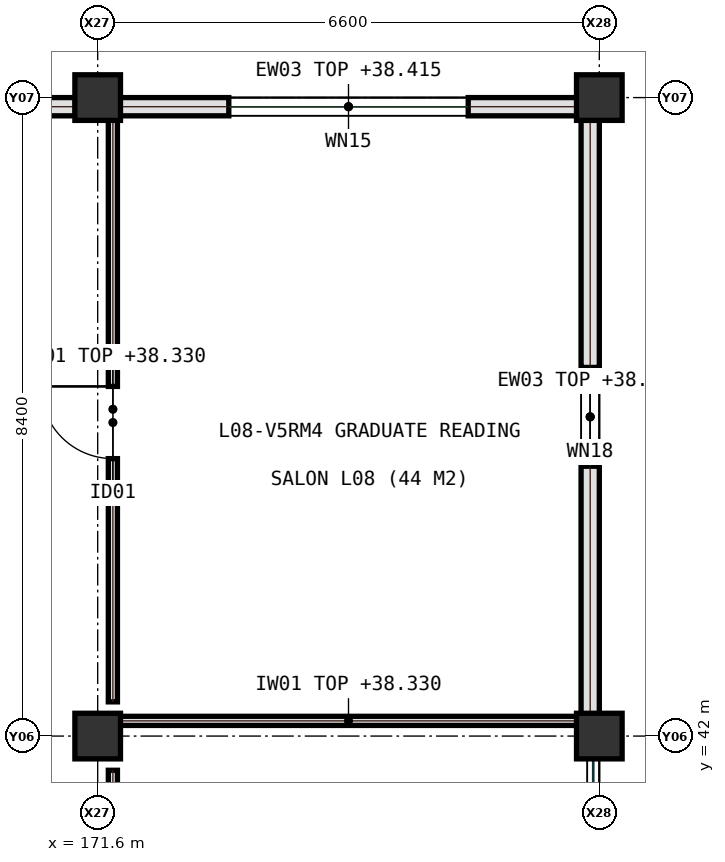
"""IFC4 building model, lengths in metres.
Left out: names, types, materials, properties, quantities, classifications, styles, units other than length and angle.
Written with IfcOpenShell. Run it as: python <this file> out.ifc"""

import sys

from ifc_helpers import new_model, si_unit, direction, frame, frame_2d, origin, origin_2d, place, context, subcontext, project, spatial, rectangle, extrude, element, fill, save


model = new_model("IFC4")
c1 = context("Model", 3, precision=1e-05, world=origin(), true_north=direction((0.0, 1.0)))
c2 = subcontext(c1, "Body", "Model", "MODEL_VIEW")
j1 = project(units=[si_unit("LENGTHUNIT", "METRE"), si_unit("PLANEANGLEUNIT", "RADIAN")], contexts=[c1])
p1 = place(None, origin())
s1 = spatial("IfcSite", under=j1, at=p1, CompositionType="ELEMENT")
p2 = place(p1, origin())
s2 = spatial("IfcBuilding", under=s1, at=p2, CompositionType="ELEMENT")
p3 = place(p2, frame((0.0, 0.0, 35.4)))
s3 = spatial("IfcBuildingStorey", under=s2, at=p3, CompositionType="ELEMENT", Elevation=35.4)
for number, where, z_axis, x_axis in (
    (1, (171.6, 42.0, 0.0), (0.0, 0.0, 1.0), (1.0, 0.0, 0.0)),
    (2, (171.6, 50.4, 0.0), (0.0, 0.0, 1.0), (1.0, 0.0, 0.0)),
    (3, (178.2, 42.0, 0.0), (0.0, 0.0, 1.0), (1.0, 0.0, 0.0)),
    (4, (178.2, 50.4, 0.0), (0.0, 0.0, 1.0), (1.0, 0.0, 0.0)),
):
    element("IfcColumn", number, at=place(p3, frame(where, z_axis=z_axis, x_axis=x_axis)), inside=s3, PredefinedType="COLUMN", context=c2, shape_type="SweptSolid", body=[
        extrude(rectangle(XDim=0.6, YDim=0.6, at=origin_2d()), origin(), (0.0, 0.0, 1.0), 3.9),
    ])
p4 = place(p3, frame((171.8, 33.65, 0.0), z_axis=(0.0, 0.0, 1.0), x_axis=(0.0, 1.0, 0.0)))
e5 = element("IfcWall", 5, at=p4, inside=s3, PredefinedType="PARTITIONING", context=c2, shape_type="SweptSolid", body=[
    extrude(rectangle(XDim=7.9, YDim=0.12, at=frame_2d((3.95, 0.0))), origin(), (0.0, 0.0, 1.0), 2.93),
])
p5 = place(p4, frame((1.4, 0.0, 0.0)))
e6 = element("IfcOpeningElement", 6, at=p5, cuts=e5, PredefinedType="OPENING", context=c2, shape_type="SweptSolid", body=[
    extrude(rectangle(XDim=0.95, YDim=2.15, at=frame_2d((0.475, 1.075))), frame((0.0, 0.07, 0.0), z_axis=(0.0, -1.0, 0.0), x_axis=(1.0, 0.0, 0.0)), (0.0, 0.0, 1.0), 0.14),
])
p6 = place(p3, frame((171.8, 42.45, 0.0), z_axis=(0.0, 0.0, 1.0), x_axis=(0.0, 1.0, 0.0)))
e7 = element("IfcWall", 7, at=p6, inside=s3, PredefinedType="PARTITIONING", context=c2, shape_type="SweptSolid", body=[
    extrude(rectangle(XDim=7.7, YDim=0.12, at=frame_2d((3.85, 0.0))), origin(), (0.0, 0.0, 1.0), 2.93),
])
p7 = place(p6, frame((3.2, 0.0, 0.0)))
e8 = element("IfcOpeningElement", 8, at=p7, cuts=e7, PredefinedType="OPENING", context=c2, shape_type="SweptSolid", body=[
    extrude(rectangle(XDim=0.95, YDim=2.15, at=frame_2d((0.475, 1.075))), frame((0.0, 0.07, 0.0), z_axis=(0.0, -1.0, 0.0), x_axis=(1.0, 0.0, 0.0)), (0.0, 0.0, 1.0), 0.14),
])
p8 = place(p3, frame((171.8, 42.2, 0.0), z_axis=(0.0, 0.0, 1.0), x_axis=(1.0, 0.0, 0.0)))
e9 = element("IfcWall", 9, at=p8, inside=s3, PredefinedType="PARTITIONING", context=c2, shape_type="SweptSolid", body=[
    extrude(rectangle(XDim=6.2, YDim=0.12, at=frame_2d((3.1, 0.0))), origin(), (0.0, 0.0, 1.0), 2.93),
])
p9 = place(p3, frame((171.305, 50.28, 0.0), z_axis=(0.0, 0.0, 1.0), x_axis=(-1.0, 0.0, 0.0)))
e10 = element("IfcWall", 10, at=p9, inside=s3, PredefinedType="SOLIDWALL", context=c2, shape_type="SweptSolid", body=[
    extrude(rectangle(XDim=6.01, YDim=0.24, at=frame_2d((3.005, 0.0))), origin(), (0.0, 0.0, 1.0), 3.015),
])
p10 = place(p9, frame((1.58, 0.0, 0.95)))
e11 = element("IfcOpeningElement", 11, at=p10, cuts=e10, PredefinedType="OPENING", context=c2, shape_type="SweptSolid", body=[
    extrude(rectangle(XDim=2.85, YDim=1.65, at=frame_2d((1.425, 0.825))), frame((0.0, 0.13, 0.0), z_axis=(0.0, -1.0, 0.0), x_axis=(1.0, 0.0, 0.0)), (0.0, 0.0, 1.0), 0.26),
])
p11 = place(p3, frame((178.08, 42.295, 0.0), z_axis=(0.0, 0.0, 1.0), x_axis=(0.0, 1.0, 0.0)))
e12 = element("IfcWall", 12, at=p11, inside=s3, PredefinedType="SOLIDWALL", context=c2, shape_type="SweptSolid", body=[
    extrude(rectangle(XDim=7.81, YDim=0.24, at=frame_2d((3.905, 0.0))), origin(), (0.0, 0.0, 1.0), 3.065),
])
p12 = place(p11, frame((3.255, 0.0, 0.95)))
e13 = element("IfcOpeningElement", 13, at=p12, cuts=e12, PredefinedType="OPENING", context=c2, shape_type="SweptSolid", body=[
    extrude(rectangle(XDim=1.3, YDim=1.75, at=frame_2d((0.65, 0.875))), frame((0.0, 0.13, 0.0), z_axis=(0.0, -1.0, 0.0), x_axis=(1.0, 0.0, 0.0)), (0.0, 0.0, 1.0), 0.26),
])
p13 = place(p3, frame((177.905, 50.28, 0.0), z_axis=(0.0, 0.0, 1.0), x_axis=(-1.0, 0.0, 0.0)))
e14 = element("IfcWall", 14, at=p13, inside=s3, PredefinedType="SOLIDWALL", context=c2, shape_type="SweptSolid", body=[
    extrude(rectangle(XDim=6.01, YDim=0.24, at=frame_2d((3.005, 0.0))), origin(), (0.0, 0.0, 1.0), 3.015),
])
p14 = place(p13, frame((1.43, 0.0, 0.95)))
e15 = element("IfcOpeningElement", 15, at=p14, cuts=e14, PredefinedType="OPENING", context=c2, shape_type="SweptSolid", body=[
    extrude(rectangle(XDim=3.15, YDim=1.7, at=frame_2d((1.575, 0.85))), frame((0.0, 0.13, 0.0), z_axis=(0.0, -1.0, 0.0), x_axis=(1.0, 0.0, 0.0)), (0.0, 0.0, 1.0), 0.26),
])
p15 = place(p7, origin())
e16 = element("IfcDoor", 16, at=p15, inside=s3, OperationType="SINGLE_SWING_RIGHT", PredefinedType="DOOR", context=c2, shape_type="SweptSolid", body=[
    extrude(rectangle(XDim=0.95, YDim=2.15, at=frame_2d((0.475, 1.075))), frame((0.0, 0.025, 0.0), z_axis=(0.0, -1.0, 0.0), x_axis=(1.0, 0.0, 0.0)), (0.0, 0.0, 1.0), 0.05),
])
fill(e8, e16)
p16 = place(p12, origin())
e17 = element("IfcWindow", 17, at=p16, inside=s3, PartitioningType="SINGLE_PANEL", PredefinedType="WINDOW", context=c2, shape_type="SweptSolid", body=[
    extrude(rectangle(XDim=1.3, YDim=1.75, at=frame_2d((0.65, 0.875))), frame((0.0, 0.03, 0.0), z_axis=(0.0, -1.0, 0.0), x_axis=(1.0, 0.0, 0.0)), (0.0, 0.0, 1.0), 0.06),
])
fill(e13, e17)
p17 = place(p14, origin())
e18 = element("IfcWindow", 18, at=p17, inside=s3, PartitioningType="SINGLE_PANEL", PredefinedType="WINDOW", context=c2, shape_type="SweptSolid", body=[
    extrude(rectangle(XDim=3.15, YDim=1.7, at=frame_2d((1.575, 0.85))), frame((0.0, 0.03, 0.0), z_axis=(0.0, -1.0, 0.0), x_axis=(1.0, 0.0, 0.0)), (0.0, 0.0, 1.0), 0.06),
])
fill(e15, e18)
save(model, sys.argv[1])
